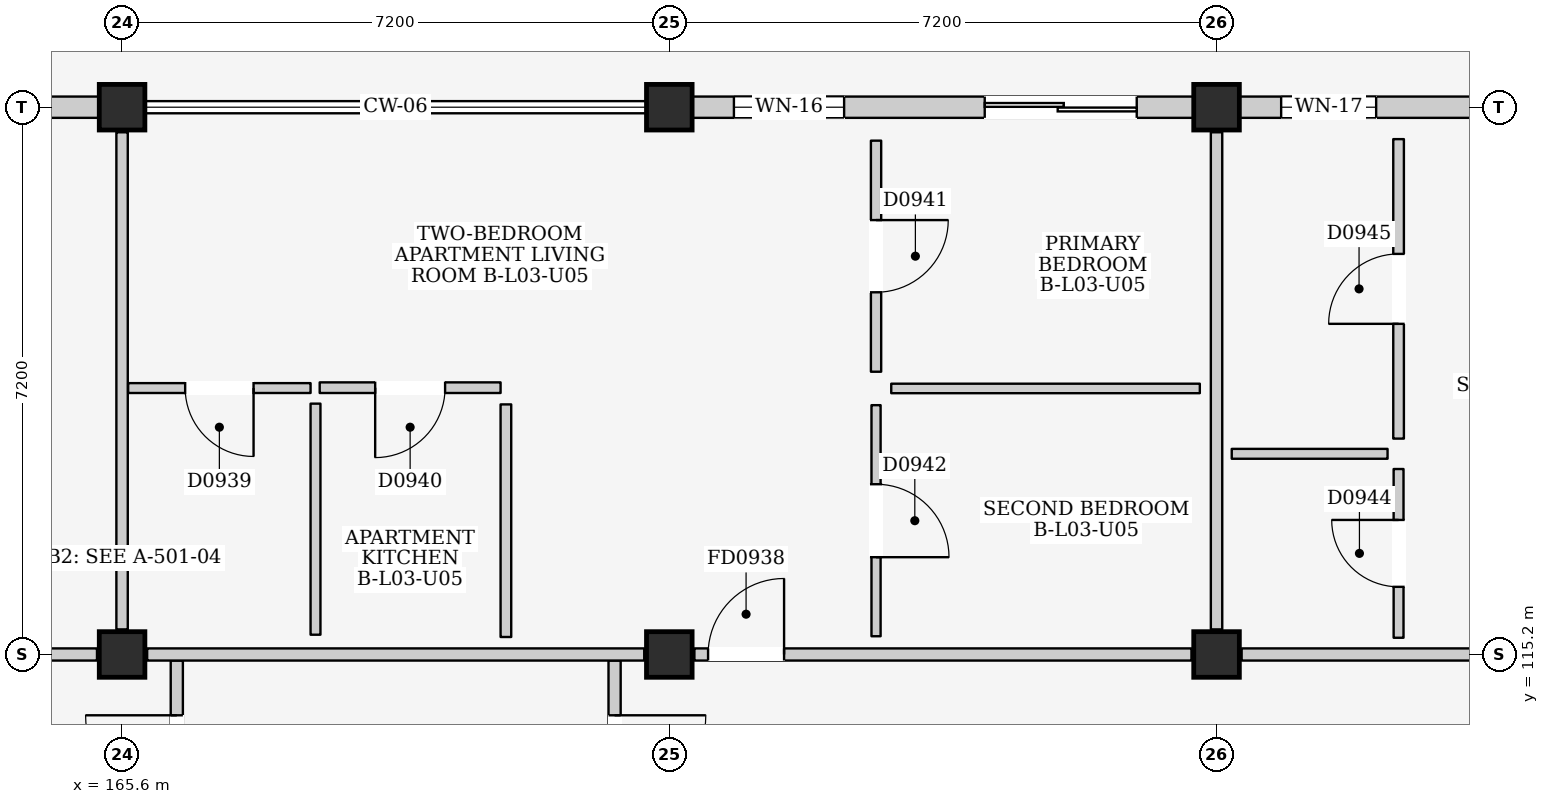
"""IFC4 building model, lengths in metres.
Left out: names, types, materials, properties, quantities, classifications, styles, units other than length and angle.
Written with IfcOpenShell. Run it as: python <this file> out.ifc"""

import sys

from ifc_helpers import new_model, si_unit, direction, frame, frame_2d, origin, origin_2d, place, context, subcontext, project, spatial, rectangle, extrude, element, fill, save


model = new_model("IFC4")
c1 = context("Model", 3, precision=1e-05, world=origin(), true_north=direction((0.0, 1.0)))
c2 = subcontext(c1, "Body", "Model", "MODEL_VIEW")
j1 = project(units=[si_unit("LENGTHUNIT", "METRE"), si_unit("PLANEANGLEUNIT", "RADIAN")], contexts=[c1])
p1 = place(None, origin())
s1 = spatial("IfcSite", under=j1, at=p1, CompositionType="ELEMENT")
p2 = place(p1, origin())
s2 = spatial("IfcBuilding", under=s1, at=p2, CompositionType="ELEMENT")
p3 = place(p2, frame((0.0, 0.0, 12.2)))
s3 = spatial("IfcBuildingStorey", under=s2, at=p3, CompositionType="ELEMENT", Elevation=12.2)
for number, where, z_axis, x_axis in (
    (1, (165.6, 115.2, 0.0), (0.0, 0.0, 1.0), (1.0, 0.0, 0.0)),
    (2, (165.6, 122.4, 0.0), (0.0, 0.0, 1.0), (1.0, 0.0, 0.0)),
    (3, (172.8, 115.2, 0.0), (0.0, 0.0, 1.0), (1.0, 0.0, 0.0)),
    (4, (172.8, 122.4, 0.0), (0.0, 0.0, 1.0), (1.0, 0.0, 0.0)),
    (5, (180.0, 115.2, 0.0), (0.0, 0.0, 1.0), (1.0, 0.0, 0.0)),
    (6, (180.0, 122.4, 0.0), (0.0, 0.0, 1.0), (1.0, 0.0, 0.0)),
):
    element("IfcColumn", number, at=place(p3, frame(where, z_axis=z_axis, x_axis=x_axis)), inside=s3, PredefinedType="COLUMN", context=c2, shape_type="SweptSolid", body=[
        extrude(rectangle(XDim=0.6, YDim=0.6, at=origin_2d()), origin(), (0.0, 0.0, 1.0), 3.2),
    ])
p4 = place(p3, frame((158.7, 122.4, 0.0), z_axis=(0.0, 0.0, 1.0), x_axis=(1.0, 0.0, 0.0)))
e7 = element("IfcWall", 7, at=p4, inside=s3, PredefinedType="ELEMENTEDWALL", context=c2, shape_type="SweptSolid", body=[
    extrude(rectangle(XDim=6.6, YDim=0.28, at=frame_2d((3.3, 0.0))), origin(), (0.0, 0.0, 1.0), 2.445),
])
p5 = place(p4, frame((3.85, 0.0, 0.0)))
e8 = element("IfcOpeningElement", 8, at=p5, cuts=e7, PredefinedType="OPENING", context=c2, shape_type="SweptSolid", body=[
    extrude(rectangle(XDim=1.5, YDim=2.12, at=frame_2d((0.75, 1.06))), frame((0.0, 0.155, 0.0), z_axis=(0.0, -1.0, 0.0), x_axis=(1.0, 0.0, 0.0)), (0.0, 0.0, 1.0), 0.31),
])
p6 = place(p4, frame((0.55, 0.0, 0.835)))
e9 = element("IfcOpeningElement", 9, at=p6, cuts=e7, PredefinedType="OPENING", context=c2, shape_type="SweptSolid", body=[
    extrude(rectangle(XDim=1.35, YDim=1.5, at=frame_2d((0.675, 0.75))), frame((0.0, 0.155, 0.0), z_axis=(0.0, -1.0, 0.0), x_axis=(1.0, 0.0, 0.0)), (0.0, 0.0, 1.0), 0.31),
])
p7 = place(p3, frame((173.1, 122.4, 0.0), z_axis=(0.0, 0.0, 1.0), x_axis=(1.0, 0.0, 0.0)))
e10 = element("IfcWall", 10, at=p7, inside=s3, PredefinedType="ELEMENTEDWALL", context=c2, shape_type="SweptSolid", body=[
    extrude(rectangle(XDim=6.6, YDim=0.28, at=frame_2d((3.3, 0.0))), origin(), (0.0, 0.0, 1.0), 2.445),
])
p8 = place(p7, frame((3.85, 0.0, 0.0)))
e11 = element("IfcOpeningElement", 11, at=p8, cuts=e10, PredefinedType="OPENING", context=c2, shape_type="SweptSolid", body=[
    extrude(rectangle(XDim=2.0, YDim=2.12, at=frame_2d((1.0, 1.06))), frame((0.0, 0.155, 0.0), z_axis=(0.0, -1.0, 0.0), x_axis=(1.0, 0.0, 0.0)), (0.0, 0.0, 1.0), 0.31),
])
p9 = place(p7, frame((0.55, 0.0, 0.9)))
e12 = element("IfcOpeningElement", 12, at=p9, cuts=e10, PredefinedType="OPENING", context=c2, shape_type="SweptSolid", body=[
    extrude(rectangle(XDim=1.45, YDim=1.4, at=frame_2d((0.725, 0.7))), frame((0.0, 0.155, 0.0), z_axis=(0.0, -1.0, 0.0), x_axis=(1.0, 0.0, 0.0)), (0.0, 0.0, 1.0), 0.31),
])
p10 = place(p3, frame((180.3, 122.4, 0.0), z_axis=(0.0, 0.0, 1.0), x_axis=(1.0, 0.0, 0.0)))
e13 = element("IfcWall", 13, at=p10, inside=s3, PredefinedType="ELEMENTEDWALL", context=c2, shape_type="SweptSolid", body=[
    extrude(rectangle(XDim=6.6, YDim=0.28, at=frame_2d((3.3, 0.0))), origin(), (0.0, 0.0, 1.0), 2.445),
])
p11 = place(p10, frame((3.85, 0.0, 0.0)))
e14 = element("IfcOpeningElement", 14, at=p11, cuts=e13, PredefinedType="OPENING", context=c2, shape_type="SweptSolid", body=[
    extrude(rectangle(XDim=1.4, YDim=2.1, at=frame_2d((0.7, 1.05))), frame((0.0, 0.155, 0.0), z_axis=(0.0, -1.0, 0.0), x_axis=(1.0, 0.0, 0.0)), (0.0, 0.0, 1.0), 0.31),
])
p12 = place(p10, frame((0.55, 0.0, 0.9)))
e15 = element("IfcOpeningElement", 15, at=p12, cuts=e13, PredefinedType="OPENING", context=c2, shape_type="SweptSolid", body=[
    extrude(rectangle(XDim=1.25, YDim=1.3, at=frame_2d((0.625, 0.65))), frame((0.0, 0.155, 0.0), z_axis=(0.0, -1.0, 0.0), x_axis=(1.0, 0.0, 0.0)), (0.0, 0.0, 1.0), 0.31),
])
p13 = place(p3, frame((166.32, 110.8, 0.0), z_axis=(0.0, 0.0, 1.0), x_axis=(0.0, 1.0, 0.0)))
e16 = element("IfcWall", 16, at=p13, inside=s3, PredefinedType="PARTITIONING", context=c2, shape_type="SweptSolid", body=[
    extrude(rectangle(XDim=4.32, YDim=0.16, at=frame_2d((2.16, 0.0))), origin(), (0.0, 0.0, 1.0), 2.98),
])
p14 = place(p13, frame((2.4, 0.0, 0.0)))
e17 = element("IfcOpeningElement", 17, at=p14, cuts=e16, PredefinedType="OPENING", context=c2, shape_type="SweptSolid", body=[
    extrude(rectangle(XDim=1.2, YDim=2.2, at=frame_2d((0.6, 1.1))), frame((0.0, 0.095, 0.0), z_axis=(0.0, -1.0, 0.0), x_axis=(1.0, 0.0, 0.0)), (0.0, 0.0, 1.0), 0.19),
])
p15 = place(p3, frame((172.08, 110.8, 0.0), z_axis=(0.0, 0.0, 1.0), x_axis=(0.0, 1.0, 0.0)))
e18 = element("IfcWall", 18, at=p15, inside=s3, PredefinedType="PARTITIONING", context=c2, shape_type="SweptSolid", body=[
    extrude(rectangle(XDim=4.32, YDim=0.16, at=frame_2d((2.16, 0.0))), origin(), (0.0, 0.0, 1.0), 2.98),
])
p16 = place(p15, frame((2.4, 0.0, 0.0)))
e19 = element("IfcOpeningElement", 19, at=p16, cuts=e18, PredefinedType="OPENING", context=c2, shape_type="SweptSolid", body=[
    extrude(rectangle(XDim=1.2, YDim=2.2, at=frame_2d((0.6, 1.1))), frame((0.0, 0.095, 0.0), z_axis=(0.0, -1.0, 0.0), x_axis=(1.0, 0.0, 0.0)), (0.0, 0.0, 1.0), 0.19),
])
p17 = place(p3, frame((158.73, 115.2, 0.0), z_axis=(0.0, 0.0, 1.0), x_axis=(1.0, 0.0, 0.0)))
e20 = element("IfcWall", 20, at=p17, inside=s3, PredefinedType="PARTITIONING", context=c2, shape_type="SweptSolid", body=[
    extrude(rectangle(XDim=6.54, YDim=0.16, at=frame_2d((3.27, 0.0))), origin(), (0.0, 0.0, 1.0), 2.365),
])
p18 = place(p17, frame((4.12, 0.0, 0.0)))
e21 = element("IfcOpeningElement", 21, at=p18, cuts=e20, PredefinedType="OPENING", context=c2, shape_type="SweptSolid", body=[
    extrude(rectangle(XDim=1.0, YDim=2.15, at=frame_2d((0.5, 1.075))), frame((0.0, 0.095, 0.0), z_axis=(0.0, -1.0, 0.0), x_axis=(1.0, 0.0, 0.0)), (0.0, 0.0, 1.0), 0.19),
])
p19 = place(p3, frame((165.6, 115.53, 0.0), z_axis=(0.0, 0.0, 1.0), x_axis=(0.0, 1.0, 0.0)))
e22 = element("IfcWall", 22, at=p19, inside=s3, PredefinedType="PARTITIONING", context=c2, shape_type="SweptSolid", body=[
    extrude(rectangle(XDim=6.54, YDim=0.15, at=frame_2d((3.27, 0.0))), origin(), (0.0, 0.0, 1.0), 2.415),
])
p20 = place(p3, frame((165.93, 115.2, 0.0), z_axis=(0.0, 0.0, 1.0), x_axis=(1.0, 0.0, 0.0)))
e23 = element("IfcWall", 23, at=p20, inside=s3, PredefinedType="PARTITIONING", context=c2, shape_type="SweptSolid", body=[
    extrude(rectangle(XDim=6.54, YDim=0.16, at=frame_2d((3.27, 0.0))), origin(), (0.0, 0.0, 1.0), 2.365),
])
p21 = place(p3, frame((173.13, 115.2, 0.0), z_axis=(0.0, 0.0, 1.0), x_axis=(1.0, 0.0, 0.0)))
e24 = element("IfcWall", 24, at=p21, inside=s3, PredefinedType="PARTITIONING", context=c2, shape_type="SweptSolid", body=[
    extrude(rectangle(XDim=6.54, YDim=0.16, at=frame_2d((3.27, 0.0))), origin(), (0.0, 0.0, 1.0), 2.365),
])
p22 = place(p21, frame((0.18, 0.0, 0.0)))
e25 = element("IfcOpeningElement", 25, at=p22, cuts=e24, PredefinedType="OPENING", context=c2, shape_type="SweptSolid", body=[
    extrude(rectangle(XDim=1.0, YDim=2.15, at=frame_2d((0.5, 1.075))), frame((0.0, 0.095, 0.0), z_axis=(0.0, -1.0, 0.0), x_axis=(1.0, 0.0, 0.0)), (0.0, 0.0, 1.0), 0.19),
])
p23 = place(p3, frame((180.0, 115.53, 0.0), z_axis=(0.0, 0.0, 1.0), x_axis=(0.0, 1.0, 0.0)))
e26 = element("IfcWall", 26, at=p23, inside=s3, PredefinedType="PARTITIONING", context=c2, shape_type="SweptSolid", body=[
    extrude(rectangle(XDim=6.54, YDim=0.15, at=frame_2d((3.27, 0.0))), origin(), (0.0, 0.0, 1.0), 2.415),
])
p24 = place(p3, frame((165.68, 118.705, 0.0), z_axis=(0.0, 0.0, 1.0), x_axis=(1.0, 0.0, 0.0)))
e27 = element("IfcWall", 27, at=p24, inside=s3, PredefinedType="PARTITIONING", context=c2, shape_type="SweptSolid", body=[
    extrude(rectangle(XDim=2.4, YDim=0.13, at=frame_2d((1.2, 0.0))), origin(), (0.0, 0.0, 1.0), 2.98),
])
p25 = place(p24, frame((0.75, 0.0, 0.0)))
e28 = element("IfcOpeningElement", 28, at=p25, cuts=e27, PredefinedType="OPENING", context=c2, shape_type="SweptSolid", body=[
    extrude(rectangle(XDim=0.9, YDim=2.1, at=frame_2d((0.45, 1.05))), frame((0.0, 0.08, 0.0), z_axis=(0.0, -1.0, 0.0), x_axis=(1.0, 0.0, 0.0)), (0.0, 0.0, 1.0), 0.16),
])
p26 = place(p3, frame((168.145, 115.46, 0.0), z_axis=(0.0, 0.0, 1.0), x_axis=(0.0, 1.0, 0.0)))
e29 = element("IfcWall", 29, at=p26, inside=s3, PredefinedType="PARTITIONING", context=c2, shape_type="SweptSolid", body=[
    extrude(rectangle(XDim=3.04, YDim=0.13, at=frame_2d((1.52, 0.0))), origin(), (0.0, 0.0, 1.0), 2.98),
])
p27 = place(p3, frame((168.2, 118.71, 0.0), z_axis=(0.0, 0.0, 1.0), x_axis=(1.0, 0.0, 0.0)))
e30 = element("IfcWall", 30, at=p27, inside=s3, PredefinedType="PARTITIONING", context=c2, shape_type="SweptSolid", body=[
    extrude(rectangle(XDim=2.38, YDim=0.14, at=frame_2d((1.19, 0.0))), origin(), (0.0, 0.0, 1.0), 2.98),
])
p28 = place(p27, frame((0.73, 0.0, 0.0)))
e31 = element("IfcOpeningElement", 31, at=p28, cuts=e30, PredefinedType="OPENING", context=c2, shape_type="SweptSolid", body=[
    extrude(rectangle(XDim=0.92, YDim=2.1, at=frame_2d((0.46, 1.05))), frame((0.0, 0.085, 0.0), z_axis=(0.0, -1.0, 0.0), x_axis=(1.0, 0.0, 0.0)), (0.0, 0.0, 1.0), 0.17),
])
p29 = place(p3, frame((170.65, 115.43, 0.0), z_axis=(0.0, 0.0, 1.0), x_axis=(0.0, 1.0, 0.0)))
e32 = element("IfcWall", 32, at=p29, inside=s3, PredefinedType="PARTITIONING", context=c2, shape_type="SweptSolid", body=[
    extrude(rectangle(XDim=3.06, YDim=0.14, at=frame_2d((1.53, 0.0))), origin(), (0.0, 0.0, 1.0), 2.98),
])
p30 = place(p3, frame((175.52, 118.92, 0.0), z_axis=(0.0, 0.0, 1.0), x_axis=(0.0, 1.0, 0.0)))
e33 = element("IfcWall", 33, at=p30, inside=s3, PredefinedType="PARTITIONING", context=c2, shape_type="SweptSolid", body=[
    extrude(rectangle(XDim=3.04, YDim=0.135, at=frame_2d((1.52, 0.0))), origin(), (0.0, 0.0, 1.0), 2.98),
])
p31 = place(p30, frame((1.045, 0.0, 0.0)))
e34 = element("IfcOpeningElement", 34, at=p31, cuts=e33, PredefinedType="OPENING", context=c2, shape_type="SweptSolid", body=[
    extrude(rectangle(XDim=0.95, YDim=2.15, at=frame_2d((0.475, 1.075))), frame((0.0, 0.083, 0.0), z_axis=(0.0, -1.0, 0.0), x_axis=(1.0, 0.0, 0.0)), (0.0, 0.0, 1.0), 0.165),
])
p32 = place(p3, frame((175.72, 118.7, 0.0), z_axis=(0.0, 0.0, 1.0), x_axis=(1.0, 0.0, 0.0)))
e35 = element("IfcWall", 35, at=p32, inside=s3, PredefinedType="PARTITIONING", context=c2, shape_type="SweptSolid", body=[
    extrude(rectangle(XDim=4.06, YDim=0.125, at=frame_2d((2.03, 0.0))), origin(), (0.0, 0.0, 1.0), 2.98),
])
p33 = place(p3, frame((175.52, 115.44, 0.0), z_axis=(0.0, 0.0, 1.0), x_axis=(0.0, 1.0, 0.0)))
e36 = element("IfcWall", 36, at=p33, inside=s3, PredefinedType="PARTITIONING", context=c2, shape_type="SweptSolid", body=[
    extrude(rectangle(XDim=3.04, YDim=0.12, at=frame_2d((1.52, 0.0))), origin(), (0.0, 0.0, 1.0), 2.98),
])
p34 = place(p33, frame((1.04, 0.0, 0.0)))
e37 = element("IfcOpeningElement", 37, at=p34, cuts=e36, PredefinedType="OPENING", context=c2, shape_type="SweptSolid", body=[
    extrude(rectangle(XDim=0.96, YDim=2.15, at=frame_2d((0.48, 1.075))), frame((0.0, 0.075, 0.0), z_axis=(0.0, -1.0, 0.0), x_axis=(1.0, 0.0, 0.0)), (0.0, 0.0, 1.0), 0.15),
])
p35 = place(p3, frame((180.33, 115.2, 0.0), z_axis=(0.0, 0.0, 1.0), x_axis=(1.0, 0.0, 0.0)))
e38 = element("IfcWall", 38, at=p35, inside=s3, PredefinedType="PARTITIONING", context=c2, shape_type="SweptSolid", body=[
    extrude(rectangle(XDim=6.54, YDim=0.16, at=frame_2d((3.27, 0.0))), origin(), (0.0, 0.0, 1.0), 2.365),
])
p36 = place(p35, frame((4.12, 0.0, 0.0)))
e39 = element("IfcOpeningElement", 39, at=p36, cuts=e38, PredefinedType="OPENING", context=c2, shape_type="SweptSolid", body=[
    extrude(rectangle(XDim=1.0, YDim=2.15, at=frame_2d((0.5, 1.075))), frame((0.0, 0.095, 0.0), z_axis=(0.0, -1.0, 0.0), x_axis=(1.0, 0.0, 0.0)), (0.0, 0.0, 1.0), 0.19),
])
p37 = place(p3, frame((180.2, 117.84, 0.0), z_axis=(0.0, 0.0, 1.0), x_axis=(1.0, 0.0, 0.0)))
e40 = element("IfcWall", 40, at=p37, inside=s3, PredefinedType="PARTITIONING", context=c2, shape_type="SweptSolid", body=[
    extrude(rectangle(XDim=2.05, YDim=0.13, at=frame_2d((1.025, 0.0))), origin(), (0.0, 0.0, 1.0), 2.98),
])
p38 = place(p3, frame((182.395, 115.42, 0.0), z_axis=(0.0, 0.0, 1.0), x_axis=(0.0, 1.0, 0.0)))
e41 = element("IfcWall", 41, at=p38, inside=s3, PredefinedType="PARTITIONING", context=c2, shape_type="SweptSolid", body=[
    extrude(rectangle(XDim=2.22, YDim=0.13, at=frame_2d((1.11, 0.0))), origin(), (0.0, 0.0, 1.0), 2.98),
])
p39 = place(p38, frame((0.67, 0.0, 0.0)))
e42 = element("IfcOpeningElement", 42, at=p39, cuts=e41, PredefinedType="OPENING", context=c2, shape_type="SweptSolid", body=[
    extrude(rectangle(XDim=0.88, YDim=2.1, at=frame_2d((0.44, 1.05))), frame((0.0, 0.08, 0.0), z_axis=(0.0, -1.0, 0.0), x_axis=(1.0, 0.0, 0.0)), (0.0, 0.0, 1.0), 0.16),
])
p40 = place(p3, frame((182.395, 118.04, 0.0), z_axis=(0.0, 0.0, 1.0), x_axis=(0.0, 1.0, 0.0)))
e43 = element("IfcWall", 43, at=p40, inside=s3, PredefinedType="PARTITIONING", context=c2, shape_type="SweptSolid", body=[
    extrude(rectangle(XDim=3.94, YDim=0.14, at=frame_2d((1.97, 0.0))), origin(), (0.0, 0.0, 1.0), 2.98),
])
p41 = place(p40, frame((1.51, 0.0, 0.0)))
e44 = element("IfcOpeningElement", 44, at=p41, cuts=e43, PredefinedType="OPENING", context=c2, shape_type="SweptSolid", body=[
    extrude(rectangle(XDim=0.92, YDim=2.1, at=frame_2d((0.46, 1.05))), frame((0.0, 0.085, 0.0), z_axis=(0.0, -1.0, 0.0), x_axis=(1.0, 0.0, 0.0)), (0.0, 0.0, 1.0), 0.17),
])
p42 = place(p8, frame((2.0, 0.0, 0.0), z_axis=(0.0, 0.0, 1.0), x_axis=(-1.0, 0.0, 0.0)))
e45 = element("IfcDoor", 45, at=p42, inside=s3, OperationType="DOUBLE_DOOR_SLIDING", PredefinedType="DOOR", context=c2, shape_type="SweptSolid", body=[
    extrude(rectangle(XDim=2.0, YDim=2.12, at=frame_2d((1.0, 1.06))), frame((0.0, 0.025, 0.0), z_axis=(0.0, -1.0, 0.0), x_axis=(1.0, 0.0, 0.0)), (0.0, 0.0, 1.0), 0.05),
])
fill(e11, e45)
p43 = place(p9, origin())
e46 = element("IfcWindow", 46, at=p43, inside=s3, PartitioningType="DOUBLE_PANEL_VERTICAL", PredefinedType="WINDOW", context=c2, shape_type="SweptSolid", body=[
    extrude(rectangle(XDim=1.45, YDim=1.4, at=frame_2d((0.725, 0.7))), frame((0.0, 0.03, 0.0), z_axis=(0.0, -1.0, 0.0), x_axis=(1.0, 0.0, 0.0)), (0.0, 0.0, 1.0), 0.06),
])
fill(e12, e46)
p44 = place(p12, origin())
e47 = element("IfcWindow", 47, at=p44, inside=s3, PartitioningType="SINGLE_PANEL", PredefinedType="WINDOW", context=c2, shape_type="SweptSolid", body=[
    extrude(rectangle(XDim=1.25, YDim=1.3, at=frame_2d((0.625, 0.65))), frame((0.0, 0.03, 0.0), z_axis=(0.0, -1.0, 0.0), x_axis=(1.0, 0.0, 0.0)), (0.0, 0.0, 1.0), 0.06),
])
fill(e15, e47)
p45 = place(p14, origin())
e48 = element("IfcDoor", 48, at=p45, inside=s3, OperationType="SINGLE_SWING_RIGHT", PredefinedType="DOOR", context=c2, shape_type="SweptSolid", body=[
    extrude(rectangle(XDim=1.2, YDim=2.2, at=frame_2d((0.6, 1.1))), frame((0.0, 0.025, 0.0), z_axis=(0.0, -1.0, 0.0), x_axis=(1.0, 0.0, 0.0)), (0.0, 0.0, 1.0), 0.05),
])
fill(e17, e48)
p46 = place(p16, frame((1.2, 0.0, 0.0), z_axis=(0.0, 0.0, 1.0), x_axis=(-1.0, 0.0, 0.0)))
e49 = element("IfcDoor", 49, at=p46, inside=s3, OperationType="SINGLE_SWING_LEFT", PredefinedType="DOOR", context=c2, shape_type="SweptSolid", body=[
    extrude(rectangle(XDim=1.2, YDim=2.2, at=frame_2d((0.6, 1.1))), frame((0.0, 0.025, 0.0), z_axis=(0.0, -1.0, 0.0), x_axis=(1.0, 0.0, 0.0)), (0.0, 0.0, 1.0), 0.05),
])
fill(e19, e49)
p47 = place(p22, origin())
e50 = element("IfcDoor", 50, at=p47, inside=s3, OperationType="SINGLE_SWING_RIGHT", PredefinedType="DOOR", context=c2, shape_type="SweptSolid", body=[
    extrude(rectangle(XDim=1.0, YDim=2.15, at=frame_2d((0.5, 1.075))), frame((0.0, 0.025, 0.0), z_axis=(0.0, -1.0, 0.0), x_axis=(1.0, 0.0, 0.0)), (0.0, 0.0, 1.0), 0.05),
])
fill(e25, e50)
p48 = place(p25, frame((0.9, 0.0, 0.0), z_axis=(0.0, 0.0, 1.0), x_axis=(-1.0, 0.0, 0.0)))
e51 = element("IfcDoor", 51, at=p48, inside=s3, OperationType="SINGLE_SWING_LEFT", PredefinedType="DOOR", context=c2, shape_type="SweptSolid", body=[
    extrude(rectangle(XDim=0.9, YDim=2.1, at=frame_2d((0.45, 1.05))), frame((0.0, 0.025, 0.0), z_axis=(0.0, -1.0, 0.0), x_axis=(1.0, 0.0, 0.0)), (0.0, 0.0, 1.0), 0.05),
])
fill(e28, e51)
p49 = place(p28, frame((0.92, 0.0, 0.0), z_axis=(0.0, 0.0, 1.0), x_axis=(-1.0, 0.0, 0.0)))
e52 = element("IfcDoor", 52, at=p49, inside=s3, OperationType="SINGLE_SWING_RIGHT", PredefinedType="DOOR", context=c2, shape_type="SweptSolid", body=[
    extrude(rectangle(XDim=0.92, YDim=2.1, at=frame_2d((0.46, 1.05))), frame((0.0, 0.025, 0.0), z_axis=(0.0, -1.0, 0.0), x_axis=(1.0, 0.0, 0.0)), (0.0, 0.0, 1.0), 0.05),
])
fill(e31, e52)
p50 = place(p31, frame((0.95, 0.0, 0.0), z_axis=(0.0, 0.0, 1.0), x_axis=(-1.0, 0.0, 0.0)))
e53 = element("IfcDoor", 53, at=p50, inside=s3, OperationType="SINGLE_SWING_LEFT", PredefinedType="DOOR", context=c2, shape_type="SweptSolid", body=[
    extrude(rectangle(XDim=0.95, YDim=2.15, at=frame_2d((0.475, 1.075))), frame((0.0, 0.025, 0.0), z_axis=(0.0, -1.0, 0.0), x_axis=(1.0, 0.0, 0.0)), (0.0, 0.0, 1.0), 0.05),
])
fill(e34, e53)
p51 = place(p34, frame((0.96, 0.0, 0.0), z_axis=(0.0, 0.0, 1.0), x_axis=(-1.0, 0.0, 0.0)))
e54 = element("IfcDoor", 54, at=p51, inside=s3, OperationType="SINGLE_SWING_RIGHT", PredefinedType="DOOR", context=c2, shape_type="SweptSolid", body=[
    extrude(rectangle(XDim=0.96, YDim=2.15, at=frame_2d((0.48, 1.075))), frame((0.0, 0.025, 0.0), z_axis=(0.0, -1.0, 0.0), x_axis=(1.0, 0.0, 0.0)), (0.0, 0.0, 1.0), 0.05),
])
fill(e37, e54)
p52 = place(p39, origin())
e55 = element("IfcDoor", 55, at=p52, inside=s3, OperationType="SINGLE_SWING_RIGHT", PredefinedType="DOOR", context=c2, shape_type="SweptSolid", body=[
    extrude(rectangle(XDim=0.88, YDim=2.1, at=frame_2d((0.44, 1.05))), frame((0.0, 0.025, 0.0), z_axis=(0.0, -1.0, 0.0), x_axis=(1.0, 0.0, 0.0)), (0.0, 0.0, 1.0), 0.05),
])
fill(e42, e55)
p53 = place(p41, origin())
e56 = element("IfcDoor", 56, at=p53, inside=s3, OperationType="SINGLE_SWING_LEFT", PredefinedType="DOOR", context=c2, shape_type="SweptSolid", body=[
    extrude(rectangle(XDim=0.92, YDim=2.1, at=frame_2d((0.46, 1.05))), frame((0.0, 0.025, 0.0), z_axis=(0.0, -1.0, 0.0), x_axis=(1.0, 0.0, 0.0)), (0.0, 0.0, 1.0), 0.05),
])
fill(e44, e56)
save(model, sys.argv[1])
